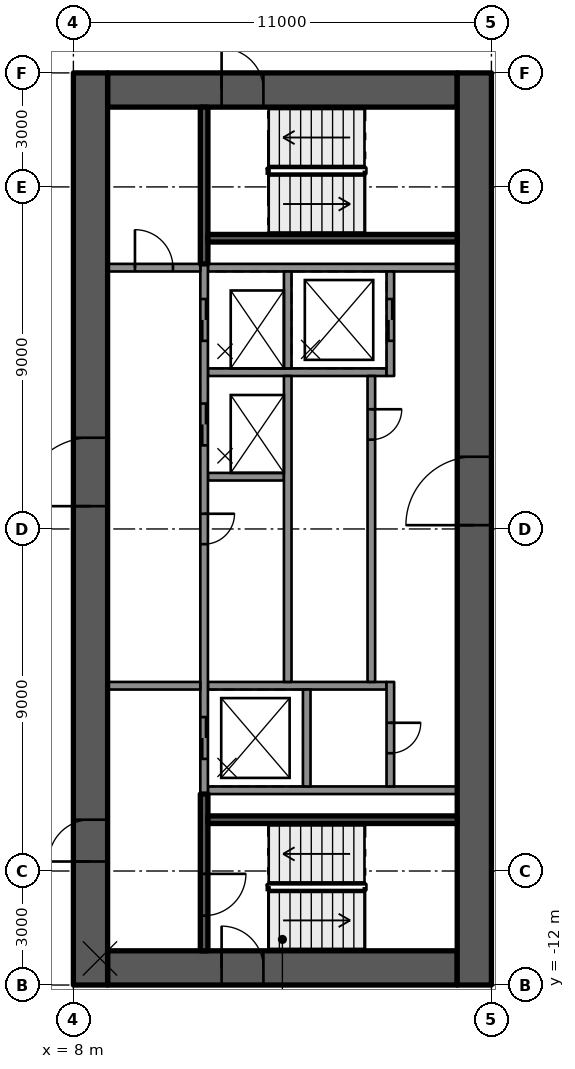
"""IFC4 building model, lengths in metres.
Left out: names, types, materials, properties, quantities, classifications, styles, units other than length and angle.
Written with IfcOpenShell. Run it as: python <this file> out.ifc"""

import sys

from ifc_helpers import new_model, si_unit, direction, frame, frame_2d, origin, place, context, subcontext, project, spatial, rectangle, extrude, element, fill, save


model = new_model("IFC4")
c1 = context("Model", 3, precision=1e-05, world=origin(), true_north=direction((0.0, 1.0)))
c2 = subcontext(c1, "Body", "Model", "MODEL_VIEW")
j1 = project(units=[si_unit("LENGTHUNIT", "METRE"), si_unit("PLANEANGLEUNIT", "RADIAN")], contexts=[c1])
p1 = place(None, origin())
s1 = spatial("IfcSite", under=j1, at=p1, CompositionType="ELEMENT")
p2 = place(p1, origin())
s2 = spatial("IfcBuilding", under=s1, at=p2, CompositionType="ELEMENT")
p3 = place(p2, frame((0.0, 0.0, 292.9)))
s3 = spatial("IfcBuildingStorey", under=s2, at=p3, CompositionType="ELEMENT", Elevation=292.9)
p4 = place(p3, frame((8.9, 11.55, 0.0), z_axis=(0.0, 0.0, 1.0), x_axis=(1.0, 0.0, 0.0)))
e1 = element("IfcWall", 1, at=p4, inside=s3, PredefinedType="SHEAR", context=c2, shape_type="SweptSolid", body=[
    extrude(rectangle(XDim=9.2, YDim=0.9, at=frame_2d((4.6, 0.0))), origin(), (0.0, 0.0, 1.0), 3.5),
])
p5 = place(p4, frame((3.0, 0.0, 0.0)))
e2 = element("IfcOpeningElement", 2, at=p5, cuts=e1, PredefinedType="OPENING", context=c2, shape_type="SweptSolid", body=[
    extrude(rectangle(XDim=1.1, YDim=2.1, at=frame_2d((0.55, 1.05))), frame((0.0, 0.46, 0.0), z_axis=(0.0, -1.0, 0.0), x_axis=(1.0, 0.0, 0.0)), (0.0, 0.0, 1.0), 0.92),
])
p6 = place(p3, frame((8.9, -11.55, 0.0), z_axis=(0.0, 0.0, 1.0), x_axis=(1.0, 0.0, 0.0)))
e3 = element("IfcWall", 3, at=p6, inside=s3, PredefinedType="SHEAR", context=c2, shape_type="SweptSolid", body=[
    extrude(rectangle(XDim=9.2, YDim=0.9, at=frame_2d((4.6, 0.0))), origin(), (0.0, 0.0, 1.0), 3.5),
])
p7 = place(p6, frame((3.0, 0.0, 0.0)))
e4 = element("IfcOpeningElement", 4, at=p7, cuts=e3, PredefinedType="OPENING", context=c2, shape_type="SweptSolid", body=[
    extrude(rectangle(XDim=1.1, YDim=2.1, at=frame_2d((0.55, 1.05))), frame((0.0, 0.46, 0.0), z_axis=(0.0, -1.0, 0.0), x_axis=(1.0, 0.0, 0.0)), (0.0, 0.0, 1.0), 0.92),
])
p8 = place(p3, frame((8.45, -12.0, 0.0), z_axis=(0.0, 0.0, 1.0), x_axis=(0.0, 1.0, 0.0)))
e5 = element("IfcWall", 5, at=p8, inside=s3, PredefinedType="SHEAR", context=c2, shape_type="SweptSolid", body=[
    extrude(rectangle(XDim=24.0, YDim=0.9, at=frame_2d((12.0, 0.0))), origin(), (0.0, 0.0, 1.0), 3.5),
])
p9 = place(p8, frame((12.6, 0.0, 0.0)))
e6 = element("IfcOpeningElement", 6, at=p9, cuts=e5, PredefinedType="OPENING", context=c2, shape_type="SweptSolid", body=[
    extrude(rectangle(XDim=1.8, YDim=2.1, at=frame_2d((0.9, 1.05))), frame((0.0, 0.46, 0.0), z_axis=(0.0, -1.0, 0.0), x_axis=(1.0, 0.0, 0.0)), (0.0, 0.0, 1.0), 0.92),
])
p10 = place(p8, frame((3.25, 0.0, 0.0)))
e7 = element("IfcOpeningElement", 7, at=p10, cuts=e5, PredefinedType="OPENING", context=c2, shape_type="SweptSolid", body=[
    extrude(rectangle(XDim=1.1, YDim=2.1, at=frame_2d((0.55, 1.05))), frame((0.0, 0.46, 0.0), z_axis=(0.0, -1.0, 0.0), x_axis=(1.0, 0.0, 0.0)), (0.0, 0.0, 1.0), 0.92),
])
p11 = place(p3, frame((18.55, -12.0, 0.0), z_axis=(0.0, 0.0, 1.0), x_axis=(0.0, 1.0, 0.0)))
e8 = element("IfcWall", 8, at=p11, inside=s3, PredefinedType="SHEAR", context=c2, shape_type="SweptSolid", body=[
    extrude(rectangle(XDim=24.0, YDim=0.9, at=frame_2d((12.0, 0.0))), origin(), (0.0, 0.0, 1.0), 3.5),
])
p12 = place(p11, frame((12.1, 0.0, 0.0)))
e9 = element("IfcOpeningElement", 9, at=p12, cuts=e8, PredefinedType="OPENING", context=c2, shape_type="SweptSolid", body=[
    extrude(rectangle(XDim=1.8, YDim=2.1, at=frame_2d((0.9, 1.05))), frame((0.0, 0.46, 0.0), z_axis=(0.0, -1.0, 0.0), x_axis=(1.0, 0.0, 0.0)), (0.0, 0.0, 1.0), 0.92),
])
for number, where, z_axis, x_axis in (
    (10, (11.54, -6.875, 0.0), (0.0, 0.0, 1.0), (1.0, 0.0, 0.0)),
    (11, (11.54, 6.875, 0.0), (0.0, 0.0, 1.0), (1.0, 0.0, 0.0)),
):
    element("IfcWall", number, at=place(p3, frame(where, z_axis=z_axis, x_axis=x_axis)), inside=s3, PredefinedType="SOLIDWALL", context=c2, shape_type="SweptSolid", body=[
        extrude(rectangle(XDim=6.56, YDim=0.2, at=frame_2d((3.28, 0.0))), origin(), (0.0, 0.0, 1.0), 3.09),
    ])
p13 = place(p3, frame((11.54, 4.125, 0.0), z_axis=(0.0, 0.0, 1.0), x_axis=(1.0, 0.0, 0.0)))
e12 = element("IfcWall", 12, at=p13, inside=s3, PredefinedType="SOLIDWALL", context=c2, shape_type="SweptSolid", body=[
    extrude(rectangle(XDim=4.7, YDim=0.2, at=frame_2d((2.35, 0.0))), origin(), (0.0, 0.0, 1.0), 3.09),
])
p14 = place(p3, frame((11.54, 1.375, 0.0), z_axis=(0.0, 0.0, 1.0), x_axis=(1.0, 0.0, 0.0)))
e13 = element("IfcWall", 13, at=p14, inside=s3, PredefinedType="SOLIDWALL", context=c2, shape_type="SweptSolid", body=[
    extrude(rectangle(XDim=2.0, YDim=0.2, at=frame_2d((1.0, 0.0))), origin(), (0.0, 0.0, 1.0), 3.09),
])
p15 = place(p3, frame((11.54, -4.125, 0.0), z_axis=(0.0, 0.0, 1.0), x_axis=(1.0, 0.0, 0.0)))
e14 = element("IfcWall", 14, at=p15, inside=s3, PredefinedType="SOLIDWALL", context=c2, shape_type="SweptSolid", body=[
    extrude(rectangle(XDim=4.7, YDim=0.2, at=frame_2d((2.35, 0.0))), origin(), (0.0, 0.0, 1.0), 3.09),
])
p16 = place(p3, frame((11.44, 6.975, 0.0), z_axis=(0.0, 0.0, 1.0), x_axis=(0.0, -1.0, 0.0)))
e15 = element("IfcWall", 15, at=p16, inside=s3, PredefinedType="SOLIDWALL", context=c2, shape_type="SweptSolid", body=[
    extrude(rectangle(XDim=13.95, YDim=0.2, at=frame_2d((6.975, 0.0))), origin(), (0.0, 0.0, 1.0), 3.09),
])
p17 = place(p16, frame((0.925, 0.0, 0.0)))
e16 = element("IfcOpeningElement", 16, at=p17, cuts=e15, PredefinedType="OPENING", context=c2, shape_type="SweptSolid", body=[
    extrude(rectangle(XDim=1.1, YDim=2.1, at=frame_2d((0.55, 1.05))), frame((0.0, 0.11, 0.0), z_axis=(0.0, -1.0, 0.0), x_axis=(1.0, 0.0, 0.0)), (0.0, 0.0, 1.0), 0.22),
])
p18 = place(p16, frame((3.675, 0.0, 0.0)))
e17 = element("IfcOpeningElement", 17, at=p18, cuts=e15, PredefinedType="OPENING", context=c2, shape_type="SweptSolid", body=[
    extrude(rectangle(XDim=1.1, YDim=2.1, at=frame_2d((0.55, 1.05))), frame((0.0, 0.11, 0.0), z_axis=(0.0, -1.0, 0.0), x_axis=(1.0, 0.0, 0.0)), (0.0, 0.0, 1.0), 0.22),
])
p19 = place(p16, frame((11.925, 0.0, 0.0)))
e18 = element("IfcOpeningElement", 18, at=p19, cuts=e15, PredefinedType="OPENING", context=c2, shape_type="SweptSolid", body=[
    extrude(rectangle(XDim=1.1, YDim=2.1, at=frame_2d((0.55, 1.05))), frame((0.0, 0.11, 0.0), z_axis=(0.0, -1.0, 0.0), x_axis=(1.0, 0.0, 0.0)), (0.0, 0.0, 1.0), 0.22),
])
p20 = place(p16, frame((6.575, 0.0, 0.0)))
e19 = element("IfcOpeningElement", 19, at=p20, cuts=e15, PredefinedType="OPENING", context=c2, shape_type="SweptSolid", body=[
    extrude(rectangle(XDim=0.8, YDim=2.1, at=frame_2d((0.4, 1.05))), frame((0.0, 0.11, 0.0), z_axis=(0.0, -1.0, 0.0), x_axis=(1.0, 0.0, 0.0)), (0.0, 0.0, 1.0), 0.22),
])
p21 = place(p3, frame((13.64, 6.775, 0.0), z_axis=(0.0, 0.0, 1.0), x_axis=(0.0, -1.0, 0.0)))
e20 = element("IfcWall", 20, at=p21, inside=s3, PredefinedType="SOLIDWALL", context=c2, shape_type="SweptSolid", body=[
    extrude(rectangle(XDim=2.55, YDim=0.2, at=frame_2d((1.275, 0.0))), origin(), (0.0, 0.0, 1.0), 3.09),
])
p22 = place(p3, frame((13.64, 4.025, 0.0), z_axis=(0.0, 0.0, 1.0), x_axis=(0.0, -1.0, 0.0)))
e21 = element("IfcWall", 21, at=p22, inside=s3, PredefinedType="SOLIDWALL", context=c2, shape_type="SweptSolid", body=[
    extrude(rectangle(XDim=8.05, YDim=0.2, at=frame_2d((4.025, 0.0))), origin(), (0.0, 0.0, 1.0), 3.09),
])
p23 = place(p3, frame((14.14, -4.225, 0.0), z_axis=(0.0, 0.0, 1.0), x_axis=(0.0, -1.0, 0.0)))
e22 = element("IfcWall", 22, at=p23, inside=s3, PredefinedType="SOLIDWALL", context=c2, shape_type="SweptSolid", body=[
    extrude(rectangle(XDim=2.55, YDim=0.2, at=frame_2d((1.275, 0.0))), origin(), (0.0, 0.0, 1.0), 3.09),
])
p24 = place(p3, frame((16.34, 6.775, 0.0), z_axis=(0.0, 0.0, 1.0), x_axis=(0.0, -1.0, 0.0)))
e23 = element("IfcWall", 23, at=p24, inside=s3, PredefinedType="SOLIDWALL", context=c2, shape_type="SweptSolid", body=[
    extrude(rectangle(XDim=2.75, YDim=0.2, at=frame_2d((1.375, 0.0))), origin(), (0.0, 0.0, 1.0), 3.09),
])
p25 = place(p24, frame((0.725, 0.0, 0.0)))
e24 = element("IfcOpeningElement", 24, at=p25, cuts=e23, PredefinedType="OPENING", context=c2, shape_type="SweptSolid", body=[
    extrude(rectangle(XDim=1.1, YDim=2.1, at=frame_2d((0.55, 1.05))), frame((0.0, 0.11, 0.0), z_axis=(0.0, -1.0, 0.0), x_axis=(1.0, 0.0, 0.0)), (0.0, 0.0, 1.0), 0.22),
])
p26 = place(p3, frame((15.84, 4.025, 0.0), z_axis=(0.0, 0.0, 1.0), x_axis=(0.0, -1.0, 0.0)))
e25 = element("IfcWall", 25, at=p26, inside=s3, PredefinedType="SOLIDWALL", context=c2, shape_type="SweptSolid", body=[
    extrude(rectangle(XDim=8.05, YDim=0.2, at=frame_2d((4.025, 0.0))), origin(), (0.0, 0.0, 1.0), 3.09),
])
p27 = place(p26, frame((0.875, 0.0, 0.0)))
e26 = element("IfcOpeningElement", 26, at=p27, cuts=e25, PredefinedType="OPENING", context=c2, shape_type="SweptSolid", body=[
    extrude(rectangle(XDim=0.8, YDim=2.1, at=frame_2d((0.4, 1.05))), frame((0.0, 0.11, 0.0), z_axis=(0.0, -1.0, 0.0), x_axis=(1.0, 0.0, 0.0)), (0.0, 0.0, 1.0), 0.22),
])
p28 = place(p3, frame((16.34, -4.025, 0.0), z_axis=(0.0, 0.0, 1.0), x_axis=(0.0, -1.0, 0.0)))
e27 = element("IfcWall", 27, at=p28, inside=s3, PredefinedType="SOLIDWALL", context=c2, shape_type="SweptSolid", body=[
    extrude(rectangle(XDim=2.75, YDim=0.2, at=frame_2d((1.375, 0.0))), origin(), (0.0, 0.0, 1.0), 3.09),
])
p29 = place(p28, frame((1.075, 0.0, 0.0)))
e28 = element("IfcOpeningElement", 28, at=p29, cuts=e27, PredefinedType="OPENING", context=c2, shape_type="SweptSolid", body=[
    extrude(rectangle(XDim=0.8, YDim=2.1, at=frame_2d((0.4, 1.05))), frame((0.0, 0.11, 0.0), z_axis=(0.0, -1.0, 0.0), x_axis=(1.0, 0.0, 0.0)), (0.0, 0.0, 1.0), 0.22),
])
p30 = place(p3, frame((11.44, -6.975, 0.0), z_axis=(0.0, 0.0, 1.0), x_axis=(0.0, -1.0, 0.0)))
e29 = element("IfcWall", 29, at=p30, inside=s3, PredefinedType="SOLIDWALL", context=c2, shape_type="SweptSolid", body=[
    extrude(rectangle(XDim=4.125, YDim=0.2, at=frame_2d((2.062, 0.0))), origin(), (0.0, 0.0, 1.0), 3.09),
])
p31 = place(p30, frame((2.1, 0.0, 0.0)))
e30 = element("IfcOpeningElement", 30, at=p31, cuts=e29, PredefinedType="OPENING", context=c2, shape_type="SweptSolid", body=[
    extrude(rectangle(XDim=1.1, YDim=2.1, at=frame_2d((0.55, 1.05))), frame((0.0, 0.11, 0.0), z_axis=(0.0, -1.0, 0.0), x_axis=(1.0, 0.0, 0.0)), (0.0, 0.0, 1.0), 0.22),
])
p32 = place(p3, frame((11.54, -7.65, 0.0), z_axis=(0.0, 0.0, 1.0), x_axis=(1.0, 0.0, 0.0)))
e31 = element("IfcWall", 31, at=p32, inside=s3, PredefinedType="SOLIDWALL", context=c2, shape_type="SweptSolid", body=[
    extrude(rectangle(XDim=6.56, YDim=0.2, at=frame_2d((3.28, 0.0))), origin(), (0.0, 0.0, 1.0), 3.09),
])
p33 = place(p3, frame((11.44, 11.1, 0.0), z_axis=(0.0, 0.0, 1.0), x_axis=(0.0, -1.0, 0.0)))
e32 = element("IfcWall", 32, at=p33, inside=s3, PredefinedType="SOLIDWALL", context=c2, shape_type="SweptSolid", body=[
    extrude(rectangle(XDim=4.125, YDim=0.2, at=frame_2d((2.062, 0.0))), origin(), (0.0, 0.0, 1.0), 3.09),
])
p34 = place(p3, frame((11.54, 7.65, 0.0), z_axis=(0.0, 0.0, 1.0), x_axis=(1.0, 0.0, 0.0)))
e33 = element("IfcWall", 33, at=p34, inside=s3, PredefinedType="SOLIDWALL", context=c2, shape_type="SweptSolid", body=[
    extrude(rectangle(XDim=6.56, YDim=0.2, at=frame_2d((3.28, 0.0))), origin(), (0.0, 0.0, 1.0), 3.09),
])
p35 = place(p3, frame((8.9, -4.125, 0.0), z_axis=(0.0, 0.0, 1.0), x_axis=(1.0, 0.0, 0.0)))
e34 = element("IfcWall", 34, at=p35, inside=s3, PredefinedType="PARTITIONING", context=c2, shape_type="SweptSolid", body=[
    extrude(rectangle(XDim=2.44, YDim=0.2, at=frame_2d((1.22, 0.0))), origin(), (0.0, 0.0, 1.0), 3.09),
])
p36 = place(p3, frame((8.9, 6.875, 0.0), z_axis=(0.0, 0.0, 1.0), x_axis=(1.0, 0.0, 0.0)))
e35 = element("IfcWall", 35, at=p36, inside=s3, PredefinedType="PARTITIONING", context=c2, shape_type="SweptSolid", body=[
    extrude(rectangle(XDim=2.44, YDim=0.2, at=frame_2d((1.22, 0.0))), origin(), (0.0, 0.0, 1.0), 3.09),
])
p37 = place(p36, frame((0.72, 0.0, 0.0)))
e36 = element("IfcOpeningElement", 36, at=p37, cuts=e35, PredefinedType="OPENING", context=c2, shape_type="SweptSolid", body=[
    extrude(rectangle(XDim=1.0, YDim=2.1, at=frame_2d((0.5, 1.05))), frame((0.0, 0.11, 0.0), z_axis=(0.0, -1.0, 0.0), x_axis=(1.0, 0.0, 0.0)), (0.0, 0.0, 1.0), 0.22),
])
p38 = place(p17, origin())
e37 = element("IfcDoor", 37, at=p38, inside=s3, OperationType="DOUBLE_DOOR_SLIDING", PredefinedType="DOOR", context=c2, shape_type="SweptSolid", body=[
    extrude(rectangle(XDim=1.1, YDim=2.1, at=frame_2d((0.55, 1.05))), frame((0.0, 0.025, 0.0), z_axis=(0.0, -1.0, 0.0), x_axis=(1.0, 0.0, 0.0)), (0.0, 0.0, 1.0), 0.05),
])
fill(e16, e37)
p39 = place(p25, origin())
e38 = element("IfcDoor", 38, at=p39, inside=s3, OperationType="DOUBLE_DOOR_SLIDING", PredefinedType="DOOR", context=c2, shape_type="SweptSolid", body=[
    extrude(rectangle(XDim=1.1, YDim=2.1, at=frame_2d((0.55, 1.05))), frame((0.0, 0.025, 0.0), z_axis=(0.0, -1.0, 0.0), x_axis=(1.0, 0.0, 0.0)), (0.0, 0.0, 1.0), 0.05),
])
fill(e24, e38)
p40 = place(p18, origin())
e39 = element("IfcDoor", 39, at=p40, inside=s3, OperationType="DOUBLE_DOOR_SLIDING", PredefinedType="DOOR", context=c2, shape_type="SweptSolid", body=[
    extrude(rectangle(XDim=1.1, YDim=2.1, at=frame_2d((0.55, 1.05))), frame((0.0, 0.025, 0.0), z_axis=(0.0, -1.0, 0.0), x_axis=(1.0, 0.0, 0.0)), (0.0, 0.0, 1.0), 0.05),
])
fill(e17, e39)
p41 = place(p19, origin())
e40 = element("IfcDoor", 40, at=p41, inside=s3, OperationType="DOUBLE_DOOR_SLIDING", PredefinedType="DOOR", context=c2, shape_type="SweptSolid", body=[
    extrude(rectangle(XDim=1.1, YDim=2.1, at=frame_2d((0.55, 1.05))), frame((0.0, 0.025, 0.0), z_axis=(0.0, -1.0, 0.0), x_axis=(1.0, 0.0, 0.0)), (0.0, 0.0, 1.0), 0.05),
])
fill(e18, e40)
p42 = place(p27, origin())
e41 = element("IfcDoor", 41, at=p42, inside=s3, OperationType="SINGLE_SWING_LEFT", PredefinedType="DOOR", context=c2, shape_type="SweptSolid", body=[
    extrude(rectangle(XDim=0.8, YDim=2.1, at=frame_2d((0.4, 1.05))), frame((0.0, 0.025, 0.0), z_axis=(0.0, -1.0, 0.0), x_axis=(1.0, 0.0, 0.0)), (0.0, 0.0, 1.0), 0.05),
])
fill(e26, e41)
p43 = place(p20, origin())
e42 = element("IfcDoor", 42, at=p43, inside=s3, OperationType="SINGLE_SWING_LEFT", PredefinedType="DOOR", context=c2, shape_type="SweptSolid", body=[
    extrude(rectangle(XDim=0.8, YDim=2.1, at=frame_2d((0.4, 1.05))), frame((0.0, 0.025, 0.0), z_axis=(0.0, -1.0, 0.0), x_axis=(1.0, 0.0, 0.0)), (0.0, 0.0, 1.0), 0.05),
])
fill(e19, e42)
p44 = place(p29, origin())
e43 = element("IfcDoor", 43, at=p44, inside=s3, OperationType="SINGLE_SWING_LEFT", PredefinedType="DOOR", context=c2, shape_type="SweptSolid", body=[
    extrude(rectangle(XDim=0.8, YDim=2.1, at=frame_2d((0.4, 1.05))), frame((0.0, 0.025, 0.0), z_axis=(0.0, -1.0, 0.0), x_axis=(1.0, 0.0, 0.0)), (0.0, 0.0, 1.0), 0.05),
])
fill(e28, e43)
p45 = place(p9, origin())
e44 = element("IfcDoor", 44, at=p45, inside=s3, OperationType="SINGLE_SWING_RIGHT", PredefinedType="DOOR", context=c2, shape_type="SweptSolid", body=[
    extrude(rectangle(XDim=1.8, YDim=2.1, at=frame_2d((0.9, 1.05))), frame((0.0, 0.025, 0.0), z_axis=(0.0, -1.0, 0.0), x_axis=(1.0, 0.0, 0.0)), (0.0, 0.0, 1.0), 0.05),
])
fill(e6, e44)
p46 = place(p12, origin())
e45 = element("IfcDoor", 45, at=p46, inside=s3, OperationType="SINGLE_SWING_RIGHT", PredefinedType="DOOR", context=c2, shape_type="SweptSolid", body=[
    extrude(rectangle(XDim=1.8, YDim=2.1, at=frame_2d((0.9, 1.05))), frame((0.0, 0.025, 0.0), z_axis=(0.0, -1.0, 0.0), x_axis=(1.0, 0.0, 0.0)), (0.0, 0.0, 1.0), 0.05),
])
fill(e9, e45)
p47 = place(p10, origin())
e46 = element("IfcDoor", 46, at=p47, inside=s3, OperationType="SINGLE_SWING_LEFT", PredefinedType="DOOR", context=c2, shape_type="SweptSolid", body=[
    extrude(rectangle(XDim=1.1, YDim=2.1, at=frame_2d((0.55, 1.05))), frame((0.0, 0.025, 0.0), z_axis=(0.0, -1.0, 0.0), x_axis=(1.0, 0.0, 0.0)), (0.0, 0.0, 1.0), 0.05),
])
fill(e7, e46)
p48 = place(p7, origin())
e47 = element("IfcDoor", 47, at=p48, inside=s3, OperationType="SINGLE_SWING_LEFT", PredefinedType="DOOR", context=c2, shape_type="SweptSolid", body=[
    extrude(rectangle(XDim=1.1, YDim=2.1, at=frame_2d((0.55, 1.05))), frame((0.0, 0.025, 0.0), z_axis=(0.0, -1.0, 0.0), x_axis=(1.0, 0.0, 0.0)), (0.0, 0.0, 1.0), 0.05),
])
fill(e4, e47)
p49 = place(p5, origin())
e48 = element("IfcDoor", 48, at=p49, inside=s3, OperationType="SINGLE_SWING_LEFT", PredefinedType="DOOR", context=c2, shape_type="SweptSolid", body=[
    extrude(rectangle(XDim=1.1, YDim=2.1, at=frame_2d((0.55, 1.05))), frame((0.0, 0.025, 0.0), z_axis=(0.0, -1.0, 0.0), x_axis=(1.0, 0.0, 0.0)), (0.0, 0.0, 1.0), 0.05),
])
fill(e2, e48)
p50 = place(p31, origin())
e49 = element("IfcDoor", 49, at=p50, inside=s3, OperationType="SINGLE_SWING_RIGHT", PredefinedType="DOOR", context=c2, shape_type="SweptSolid", body=[
    extrude(rectangle(XDim=1.1, YDim=2.1, at=frame_2d((0.55, 1.05))), frame((0.0, 0.025, 0.0), z_axis=(0.0, -1.0, 0.0), x_axis=(1.0, 0.0, 0.0)), (0.0, 0.0, 1.0), 0.05),
])
fill(e30, e49)
p51 = place(p37, origin())
e50 = element("IfcDoor", 50, at=p51, inside=s3, OperationType="SINGLE_SWING_RIGHT", PredefinedType="DOOR", context=c2, shape_type="SweptSolid", body=[
    extrude(rectangle(XDim=1.0, YDim=2.1, at=frame_2d((0.5, 1.05))), frame((0.0, 0.025, 0.0), z_axis=(0.0, -1.0, 0.0), x_axis=(1.0, 0.0, 0.0)), (0.0, 0.0, 1.0), 0.05),
])
fill(e36, e50)
save(model, sys.argv[1])
